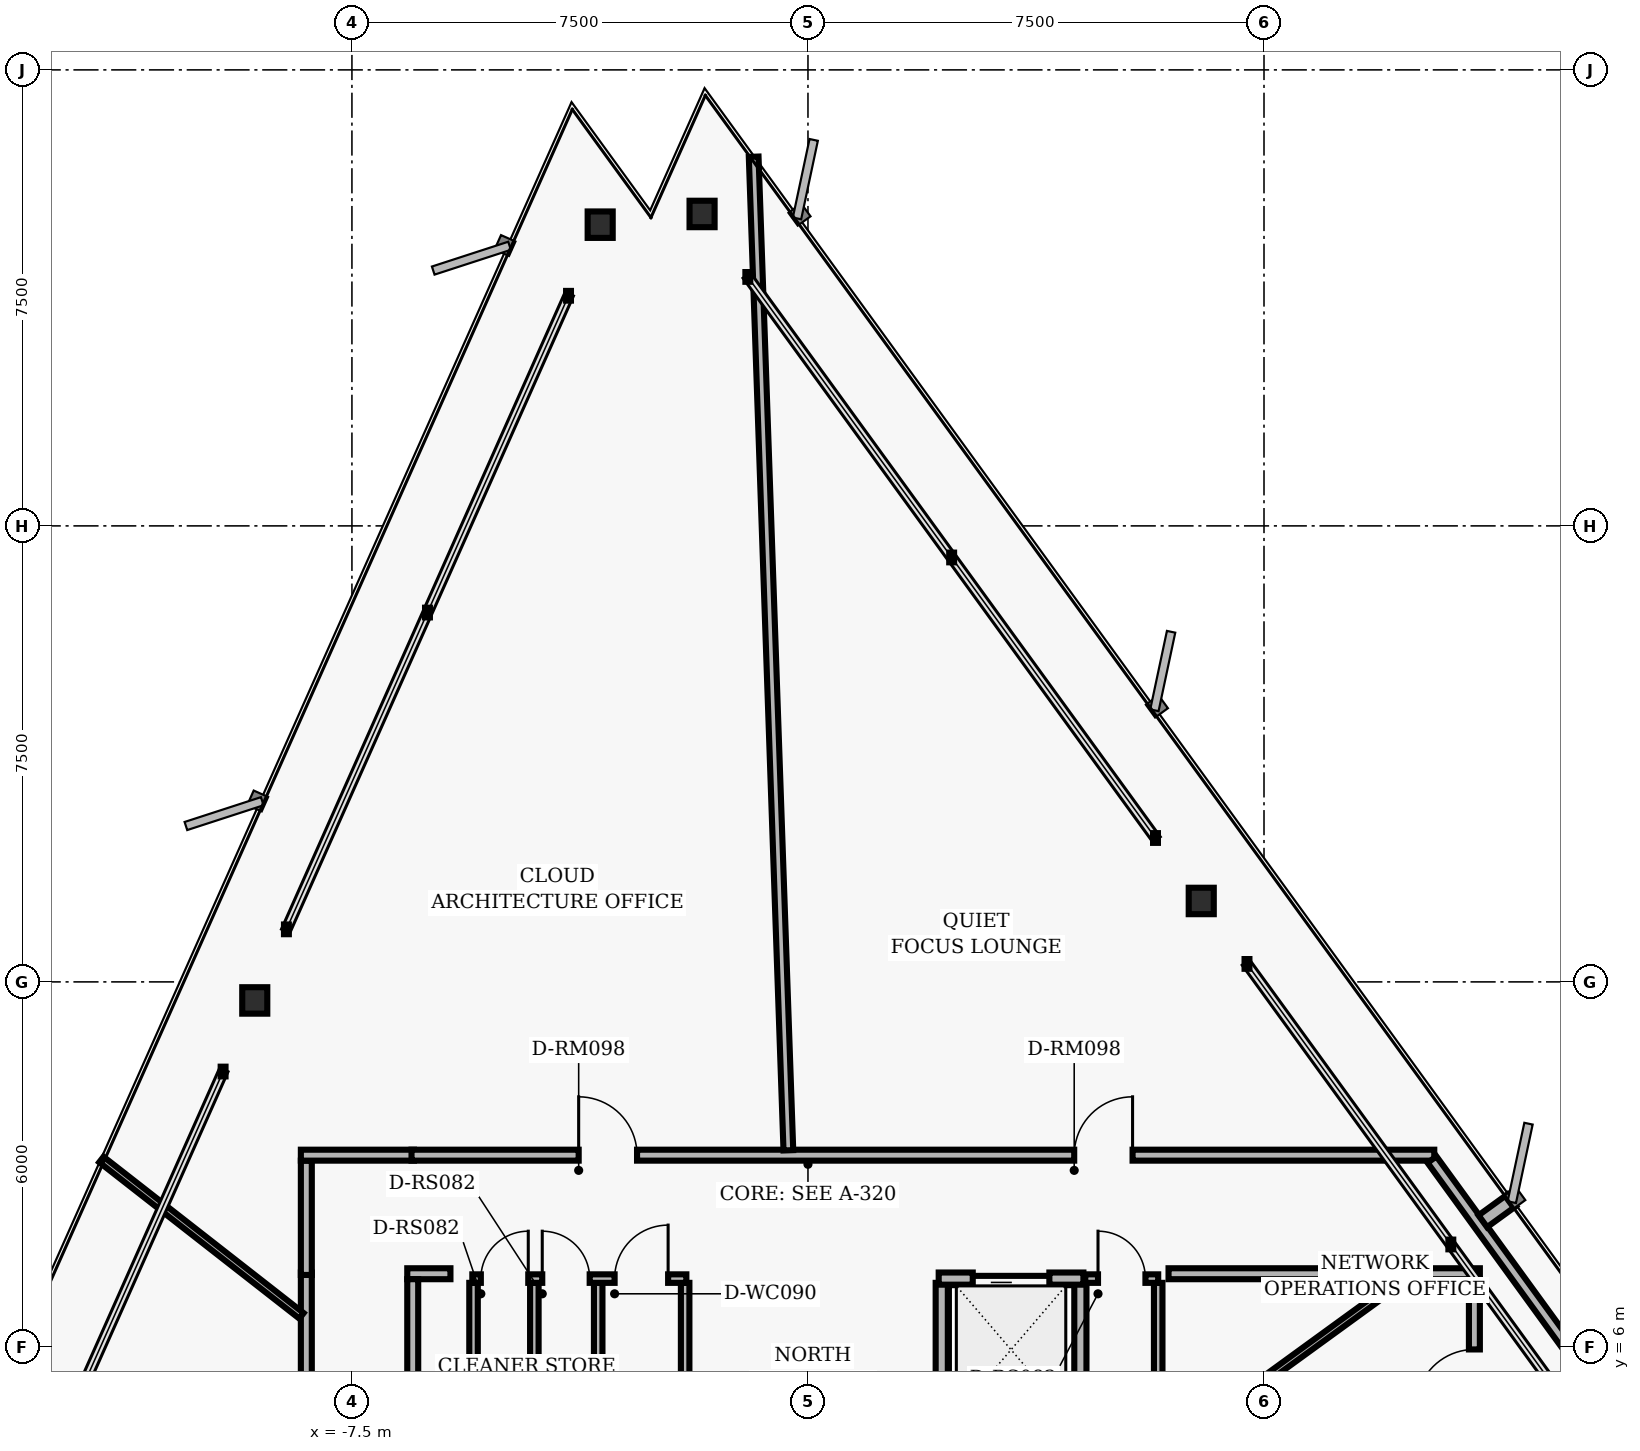
"""IFC4 building model, lengths in metres.
Left out: names, types, materials, properties, quantities, classifications, styles, units other than length and angle.
Written with IfcOpenShell. Run it as: python <this file> out.ifc"""

import sys

from ifc_helpers import new_model, si_unit, direction, frame, frame_2d, origin, origin_2d, place, context, subcontext, project, spatial, rectangle, i_section, extrude, element, fill, save


model = new_model("IFC4")
c1 = context("Model", 3, precision=1e-05, world=origin(), true_north=direction((0.0, 1.0)))
c2 = subcontext(c1, "Body", "Model", "MODEL_VIEW")
j1 = project(units=[si_unit("LENGTHUNIT", "METRE"), si_unit("PLANEANGLEUNIT", "RADIAN")], contexts=[c1])
p1 = place(None, origin())
s1 = spatial("IfcSite", under=j1, at=p1, CompositionType="ELEMENT")
p2 = place(p1, origin())
s2 = spatial("IfcBuilding", under=s1, at=p2, CompositionType="ELEMENT")
p3 = place(p2, frame((0.0, 0.0, 110.72)))
s3 = spatial("IfcBuildingStorey", under=s2, at=p3, CompositionType="ELEMENT", Elevation=110.72)
for number, where, z_axis, x_axis in (
    (1, (6.468, 13.331, 0.0), (0.0, 0.0, 1.0), (1.0, 0.0, 0.0)),
    (2, (-1.742, 24.63, 0.0), (0.0, 0.0, 1.0), (1.0, 0.0, 0.0)),
    (3, (-3.417, 24.454, 0.0), (0.0, 0.0, 1.0), (1.0, 0.0, 0.0)),
    (4, (-9.098, 11.695, 0.0), (0.0, 0.0, 1.0), (1.0, 0.0, 0.0)),
):
    element("IfcColumn", number, at=place(p3, frame(where, z_axis=z_axis, x_axis=x_axis)), inside=s3, PredefinedType="COLUMN", context=c2, shape_type="SweptSolid", body=[
        extrude(i_section(OverallWidth=0.412, OverallDepth=0.435, WebThickness=0.036, FlangeThickness=0.057, FilletRadius=0.022, at=origin_2d()), origin(), (0.0, 0.0, 1.0), 3.04),
    ])
p4 = place(p3, frame((2.2, 4.95, 0.0), z_axis=(0.0, 0.0, 1.0), x_axis=(0.0, 1.0, 0.0)))
e5 = element("IfcWall", 5, at=p4, inside=s3, PredefinedType="PARTITIONING", context=c2, shape_type="SweptSolid", body=[
    extrude(rectangle(XDim=2.1, YDim=0.2, at=frame_2d((1.05, 0.0))), origin(), (0.0, 0.0, 1.0), 2.132),
])
p5 = place(p3, frame((4.48, 4.95, 0.0), z_axis=(0.0, 0.0, 1.0), x_axis=(0.0, 1.0, 0.0)))
e6 = element("IfcWall", 6, at=p5, inside=s3, PredefinedType="PARTITIONING", context=c2, shape_type="SweptSolid", body=[
    extrude(rectangle(XDim=2.1, YDim=0.2, at=frame_2d((1.05, 0.0))), origin(), (0.0, 0.0, 1.0), 2.763),
])
p6 = place(p3, frame((2.15, 7.12, 0.0), z_axis=(0.0, 0.0, 1.0), x_axis=(1.0, 0.0, 0.0)))
e7 = element("IfcWall", 7, at=p6, inside=s3, PredefinedType="PARTITIONING", context=c2, shape_type="SweptSolid", body=[
    extrude(rectangle(XDim=2.38, YDim=0.2, at=frame_2d((1.19, 0.0))), origin(), (0.0, 0.0, 1.0), 2.763),
])
p7 = place(p6, frame((0.56, 0.0, 0.0)))
e8 = element("IfcOpeningElement", 8, at=p7, cuts=e7, PredefinedType="OPENING", context=c2, shape_type="SweptSolid", body=[
    extrude(rectangle(XDim=1.26, YDim=2.06, at=frame_2d((0.63, 1.03))), frame((0.0, 0.11, 0.0), z_axis=(0.0, -1.0, 0.0), x_axis=(1.0, 0.0, 0.0)), (0.0, 0.0, 1.0), 0.22),
])
for number, where, z_axis, x_axis in (
    (9, (-5.5, 4.95, 0.0), (0.0, 0.0, 1.0), (0.0, 1.0, 0.0)),
    (10, (-4.5, 4.95, 0.0), (0.0, 0.0, 1.0), (0.0, 1.0, 0.0)),
    (11, (-3.45, 4.95, 0.0), (0.0, 0.0, 1.0), (0.0, 1.0, 0.0)),
    (12, (-2.02, 4.95, 0.0), (0.0, 0.0, 1.0), (0.0, 1.0, 0.0)),
):
    element("IfcWall", number, at=place(p3, frame(where, z_axis=z_axis, x_axis=x_axis)), inside=s3, PredefinedType="PARTITIONING", context=c2, shape_type="SweptSolid", body=[
        extrude(rectangle(XDim=2.1, YDim=0.14, at=frame_2d((1.05, 0.0))), origin(), (0.0, 0.0, 1.0), 2.763),
    ])
p8 = place(p3, frame((-5.52, 7.12, 0.0), z_axis=(0.0, 0.0, 1.0), x_axis=(1.0, 0.0, 0.0)))
e13 = element("IfcWall", 13, at=p8, inside=s3, PredefinedType="PARTITIONING", context=c2, shape_type="SweptSolid", body=[
    extrude(rectangle(XDim=3.52, YDim=0.14, at=frame_2d((1.76, 0.0))), origin(), (0.0, 0.0, 1.0), 2.763),
])
p9 = place(p8, frame((0.14, 0.0, 0.0)))
e14 = element("IfcOpeningElement", 14, at=p9, cuts=e13, PredefinedType="OPENING", context=c2, shape_type="SweptSolid", body=[
    extrude(rectangle(XDim=0.78, YDim=2.01, at=frame_2d((0.39, 1.005))), frame((0.0, 0.08, 0.0), z_axis=(0.0, -1.0, 0.0), x_axis=(1.0, 0.0, 0.0)), (0.0, 0.0, 1.0), 0.16),
])
p10 = place(p8, frame((1.15, 0.0, 0.0)))
e15 = element("IfcOpeningElement", 15, at=p10, cuts=e13, PredefinedType="OPENING", context=c2, shape_type="SweptSolid", body=[
    extrude(rectangle(XDim=0.78, YDim=2.01, at=frame_2d((0.39, 1.005))), frame((0.0, 0.08, 0.0), z_axis=(0.0, -1.0, 0.0), x_axis=(1.0, 0.0, 0.0)), (0.0, 0.0, 1.0), 0.16),
])
p11 = place(p8, frame((2.34, 0.0, 0.0)))
e16 = element("IfcOpeningElement", 16, at=p11, cuts=e13, PredefinedType="OPENING", context=c2, shape_type="SweptSolid", body=[
    extrude(rectangle(XDim=0.88, YDim=2.02, at=frame_2d((0.44, 1.01))), frame((0.0, 0.08, 0.0), z_axis=(0.0, -1.0, 0.0), x_axis=(1.0, 0.0, 0.0)), (0.0, 0.0, 1.0), 0.16),
])
p12 = place(p3, frame((5.76, 4.95, 0.0), z_axis=(0.0, 0.0, 1.0), x_axis=(0.0, 1.0, 0.0)))
e17 = element("IfcWall", 17, at=p12, inside=s3, PredefinedType="PARTITIONING", context=c2, shape_type="SweptSolid", body=[
    extrude(rectangle(XDim=2.1, YDim=0.14, at=frame_2d((1.05, 0.0))), origin(), (0.0, 0.0, 1.0), 2.132),
])
p13 = place(p3, frame((4.56, 7.12, 0.0), z_axis=(0.0, 0.0, 1.0), x_axis=(1.0, 0.0, 0.0)))
e18 = element("IfcWall", 18, at=p13, inside=s3, PredefinedType="PARTITIONING", context=c2, shape_type="SweptSolid", body=[
    extrude(rectangle(XDim=1.2, YDim=0.14, at=frame_2d((0.6, 0.0))), origin(), (0.0, 0.0, 1.0), 2.763),
])
p14 = place(p13, frame((0.21, 0.0, 0.0)))
e19 = element("IfcOpeningElement", 19, at=p14, cuts=e18, PredefinedType="OPENING", context=c2, shape_type="SweptSolid", body=[
    extrude(rectangle(XDim=0.78, YDim=2.01, at=frame_2d((0.39, 1.005))), frame((0.0, 0.08, 0.0), z_axis=(0.0, -1.0, 0.0), x_axis=(1.0, 0.0, 0.0)), (0.0, 0.0, 1.0), 0.16),
])
p15 = place(p3, frame((-8.25, -7.22, 0.0), z_axis=(0.0, 0.0, 1.0), x_axis=(0.0, 1.0, 0.0)))
e20 = element("IfcWall", 20, at=p15, inside=s3, PredefinedType="PARTITIONING", context=c2, shape_type="SweptSolid", body=[
    extrude(rectangle(XDim=14.44, YDim=0.18, at=frame_2d((7.22, 0.0))), origin(), (0.0, 0.0, 1.0), 2.33),
])
p16 = place(p15, frame((3.038, 0.0, 0.0)))
e21 = element("IfcOpeningElement", 21, at=p16, cuts=e20, PredefinedType="OPENING", context=c2, shape_type="SweptSolid", body=[
    extrude(rectangle(XDim=0.96, YDim=2.02, at=frame_2d((0.48, 1.01))), frame((0.0, 0.1, 0.0), z_axis=(0.0, -1.0, 0.0), x_axis=(1.0, 0.0, 0.0)), (0.0, 0.0, 1.0), 0.2),
])
p17 = place(p15, frame((9.456, 0.0, 0.0)))
e22 = element("IfcOpeningElement", 22, at=p17, cuts=e20, PredefinedType="OPENING", context=c2, shape_type="SweptSolid", body=[
    extrude(rectangle(XDim=1.18, YDim=2.02, at=frame_2d((0.59, 1.01))), frame((0.0, 0.1, 0.0), z_axis=(0.0, -1.0, 0.0), x_axis=(1.0, 0.0, 0.0)), (0.0, 0.0, 1.0), 0.2),
])
p18 = place(p3, frame((-8.25, 7.18, 0.0), z_axis=(0.0, 0.0, 1.0), x_axis=(0.0, 1.0, 0.0)))
e23 = element("IfcWall", 23, at=p18, inside=s3, PredefinedType="PARTITIONING", context=c2, shape_type="SweptSolid", body=[
    extrude(rectangle(XDim=1.88, YDim=0.18, at=frame_2d((0.94, 0.0))), origin(), (0.0, 0.0, 1.0), 2.763),
])
p19 = place(p3, frame((-8.34, 9.15, 0.0), z_axis=(0.0, 0.0, 1.0), x_axis=(1.0, 0.0, 0.0)))
e24 = element("IfcWall", 24, at=p19, inside=s3, PredefinedType="PARTITIONING", context=c2, shape_type="SweptSolid", body=[
    extrude(rectangle(XDim=1.86, YDim=0.18, at=frame_2d((0.93, 0.0))), origin(), (0.0, 0.0, 1.0), 2.763),
])
p20 = place(p3, frame((-6.52, 9.15, 0.0), z_axis=(0.0, 0.0, 1.0), x_axis=(1.0, 0.0, 0.0)))
e25 = element("IfcWall", 25, at=p20, inside=s3, PredefinedType="PARTITIONING", context=c2, shape_type="SweptSolid", body=[
    extrude(rectangle(XDim=16.82, YDim=0.18, at=frame_2d((8.41, 0.0))), origin(), (0.0, 0.0, 1.0), 2.763),
])
p21 = place(p20, frame((10.898, 0.0, 0.0)))
e26 = element("IfcOpeningElement", 26, at=p21, cuts=e25, PredefinedType="OPENING", context=c2, shape_type="SweptSolid", body=[
    extrude(rectangle(XDim=0.96, YDim=2.02, at=frame_2d((0.48, 1.01))), frame((0.0, 0.1, 0.0), z_axis=(0.0, -1.0, 0.0), x_axis=(1.0, 0.0, 0.0)), (0.0, 0.0, 1.0), 0.2),
])
p22 = place(p20, frame((2.749, 0.0, 0.0)))
e27 = element("IfcOpeningElement", 27, at=p22, cuts=e25, PredefinedType="OPENING", context=c2, shape_type="SweptSolid", body=[
    extrude(rectangle(XDim=0.96, YDim=2.02, at=frame_2d((0.48, 1.01))), frame((0.0, 0.1, 0.0), z_axis=(0.0, -1.0, 0.0), x_axis=(1.0, 0.0, 0.0)), (0.0, 0.0, 1.0), 0.2),
])
p23 = place(p3, frame((10.263, 9.077, 0.0), z_axis=(0.0, 0.0, 1.0), x_axis=(0.587780951295, -0.809020119215, 0.0)))
e28 = element("IfcWall", 28, at=p23, inside=s3, PredefinedType="PARTITIONING", context=c2, shape_type="SweptSolid", body=[
    extrude(rectangle(XDim=7.469, YDim=0.18, at=frame_2d((3.734, 0.0))), origin(), (0.0, 0.0, 1.0), 2.763),
])
p24 = place(p3, frame((10.96, 3.84, 0.0), z_axis=(0.0, 0.0, 1.0), x_axis=(0.0, 1.0, 0.0)))
e29 = element("IfcWall", 29, at=p24, inside=s3, PredefinedType="PARTITIONING", context=c2, shape_type="SweptSolid", body=[
    extrude(rectangle(XDim=3.271, YDim=0.18, at=frame_2d((1.635, 0.0))), origin(), (0.0, 0.0, 1.0), 2.763),
])
p25 = place(p24, frame((1.155, 0.0, 0.0)))
e30 = element("IfcOpeningElement", 30, at=p25, cuts=e29, PredefinedType="OPENING", context=c2, shape_type="SweptSolid", body=[
    extrude(rectangle(XDim=0.96, YDim=2.02, at=frame_2d((0.48, 1.01))), frame((0.0, 0.1, 0.0), z_axis=(0.0, -1.0, 0.0), x_axis=(1.0, 0.0, 0.0)), (0.0, 0.0, 1.0), 0.2),
])
p26 = place(p3, frame((11.05, 7.2, 0.0), z_axis=(0.0, 0.0, 1.0), x_axis=(-1.0, 0.0, 0.0)))
e31 = element("IfcWall", 31, at=p26, inside=s3, PredefinedType="PARTITIONING", context=c2, shape_type="SweptSolid", body=[
    extrude(rectangle(XDim=5.12, YDim=0.18, at=frame_2d((2.56, 0.0))), origin(), (0.0, 0.0, 1.0), 2.763),
])
p27 = place(p3, frame((-5.88, 7.2, 0.0), z_axis=(0.0, 0.0, 1.0), x_axis=(-1.0, 0.0, 0.0)))
e32 = element("IfcWall", 32, at=p27, inside=s3, PredefinedType="PARTITIONING", context=c2, shape_type="SweptSolid", body=[
    extrude(rectangle(XDim=0.71, YDim=0.18, at=frame_2d((0.355, 0.0))), origin(), (0.0, 0.0, 1.0), 2.763),
])
p28 = place(p3, frame((-6.5, 7.11, 0.0), z_axis=(0.0, 0.0, 1.0), x_axis=(0.0, -1.0, 0.0)))
e33 = element("IfcWall", 33, at=p28, inside=s3, PredefinedType="PARTITIONING", context=c2, shape_type="SweptSolid", body=[
    extrude(rectangle(XDim=2.058, YDim=0.18, at=frame_2d((1.029, 0.0))), origin(), (0.0, 0.0, 1.0), 2.763),
])
p29 = place(p3, frame((6.758, 4.91, 0.0), z_axis=(0.0, 0.0, 1.0), x_axis=(0.808985911181, 0.58782803226, 0.0)))
e34 = element("IfcWall", 34, at=p29, inside=s3, PredefinedType="MOVABLE", context=c2, shape_type="SweptSolid", body=[
    extrude(rectangle(XDim=3.76, YDim=0.115, at=frame_2d((1.88, 0.0))), origin(), (0.0, 0.0, 1.0), 2.763),
])
p30 = place(p3, frame((11.098, 8.063, 0.0), z_axis=(0.0, 0.0, 1.0), x_axis=(0.809093866449, 0.587679432408, 0.0)))
e35 = element("IfcWall", 35, at=p30, inside=s3, PredefinedType="PARTITIONING", context=c2, shape_type="SweptSolid", body=[
    extrude(rectangle(XDim=0.59, YDim=0.24, at=frame_2d((0.295, 0.0))), origin(), (0.0, 0.0, 1.0), 2.763),
])
p31 = place(p3, frame((-0.322, 9.23, 0.0), z_axis=(0.0, 0.0, 1.0), x_axis=(-0.034907078812, 0.999390562217, 0.0)))
e36 = element("IfcWall", 36, at=p31, inside=s3, PredefinedType="PARTITIONING", context=c2, shape_type="SweptSolid", body=[
    extrude(rectangle(XDim=16.352, YDim=0.16, at=frame_2d((8.176, 0.0))), origin(), (0.0, 0.0, 1.0), 2.132),
])
p32 = place(p3, frame((-8.33, 6.508, 0.0), z_axis=(0.0, 0.0, 1.0), x_axis=(-0.787993347372, 0.615683753641, 0.0)))
e37 = element("IfcWall", 37, at=p32, inside=s3, PredefinedType="MOVABLE", context=c2, shape_type="SweptSolid", body=[
    extrude(rectangle(XDim=4.176, YDim=0.115, at=frame_2d((2.088, 0.0))), origin(), (0.0, 0.0, 1.0), 2.763),
])
p33 = place(p7, origin())
e38 = element("IfcDoor", 38, at=p33, inside=s3, OperationType="SLIDING_TO_LEFT", PredefinedType="DOOR", context=c2, shape_type="SweptSolid", body=[
    extrude(rectangle(XDim=1.26, YDim=2.06, at=frame_2d((0.63, 1.03))), frame((0.0, 0.025, 0.0), z_axis=(0.0, -1.0, 0.0), x_axis=(1.0, 0.0, 0.0)), (0.0, 0.0, 1.0), 0.05),
])
fill(e8, e38)
p34 = place(p9, origin())
e39 = element("IfcDoor", 39, at=p34, inside=s3, OperationType="SINGLE_SWING_RIGHT", PredefinedType="DOOR", context=c2, shape_type="SweptSolid", body=[
    extrude(rectangle(XDim=0.78, YDim=2.01, at=frame_2d((0.39, 1.005))), frame((0.0, 0.025, 0.0), z_axis=(0.0, -1.0, 0.0), x_axis=(1.0, 0.0, 0.0)), (0.0, 0.0, 1.0), 0.05),
])
fill(e14, e39)
p35 = place(p10, origin())
e40 = element("IfcDoor", 40, at=p35, inside=s3, OperationType="SINGLE_SWING_LEFT", PredefinedType="DOOR", context=c2, shape_type="SweptSolid", body=[
    extrude(rectangle(XDim=0.78, YDim=2.01, at=frame_2d((0.39, 1.005))), frame((0.0, 0.025, 0.0), z_axis=(0.0, -1.0, 0.0), x_axis=(1.0, 0.0, 0.0)), (0.0, 0.0, 1.0), 0.05),
])
fill(e15, e40)
p36 = place(p11, origin())
e41 = element("IfcDoor", 41, at=p36, inside=s3, OperationType="SINGLE_SWING_RIGHT", PredefinedType="DOOR", context=c2, shape_type="SweptSolid", body=[
    extrude(rectangle(XDim=0.88, YDim=2.02, at=frame_2d((0.44, 1.01))), frame((0.0, 0.025, 0.0), z_axis=(0.0, -1.0, 0.0), x_axis=(1.0, 0.0, 0.0)), (0.0, 0.0, 1.0), 0.05),
])
fill(e16, e41)
p37 = place(p14, origin())
e42 = element("IfcDoor", 42, at=p37, inside=s3, OperationType="SINGLE_SWING_LEFT", PredefinedType="DOOR", context=c2, shape_type="SweptSolid", body=[
    extrude(rectangle(XDim=0.78, YDim=2.01, at=frame_2d((0.39, 1.005))), frame((0.0, 0.025, 0.0), z_axis=(0.0, -1.0, 0.0), x_axis=(1.0, 0.0, 0.0)), (0.0, 0.0, 1.0), 0.05),
])
fill(e19, e42)
p38 = place(p25, origin())
e43 = element("IfcDoor", 43, at=p38, inside=s3, OperationType="SINGLE_SWING_LEFT", PredefinedType="DOOR", context=c2, shape_type="SweptSolid", body=[
    extrude(rectangle(XDim=0.96, YDim=2.02, at=frame_2d((0.48, 1.01))), frame((0.0, 0.025, 0.0), z_axis=(0.0, -1.0, 0.0), x_axis=(1.0, 0.0, 0.0)), (0.0, 0.0, 1.0), 0.05),
])
fill(e30, e43)
p39 = place(p21, origin())
e44 = element("IfcDoor", 44, at=p39, inside=s3, OperationType="SINGLE_SWING_RIGHT", PredefinedType="DOOR", context=c2, shape_type="SweptSolid", body=[
    extrude(rectangle(XDim=0.96, YDim=2.02, at=frame_2d((0.48, 1.01))), frame((0.0, 0.025, 0.0), z_axis=(0.0, -1.0, 0.0), x_axis=(1.0, 0.0, 0.0)), (0.0, 0.0, 1.0), 0.05),
])
fill(e26, e44)
p40 = place(p22, origin())
e45 = element("IfcDoor", 45, at=p40, inside=s3, OperationType="SINGLE_SWING_LEFT", PredefinedType="DOOR", context=c2, shape_type="SweptSolid", body=[
    extrude(rectangle(XDim=0.96, YDim=2.02, at=frame_2d((0.48, 1.01))), frame((0.0, 0.025, 0.0), z_axis=(0.0, -1.0, 0.0), x_axis=(1.0, 0.0, 0.0)), (0.0, 0.0, 1.0), 0.05),
])
fill(e27, e45)
save(model, sys.argv[1])
